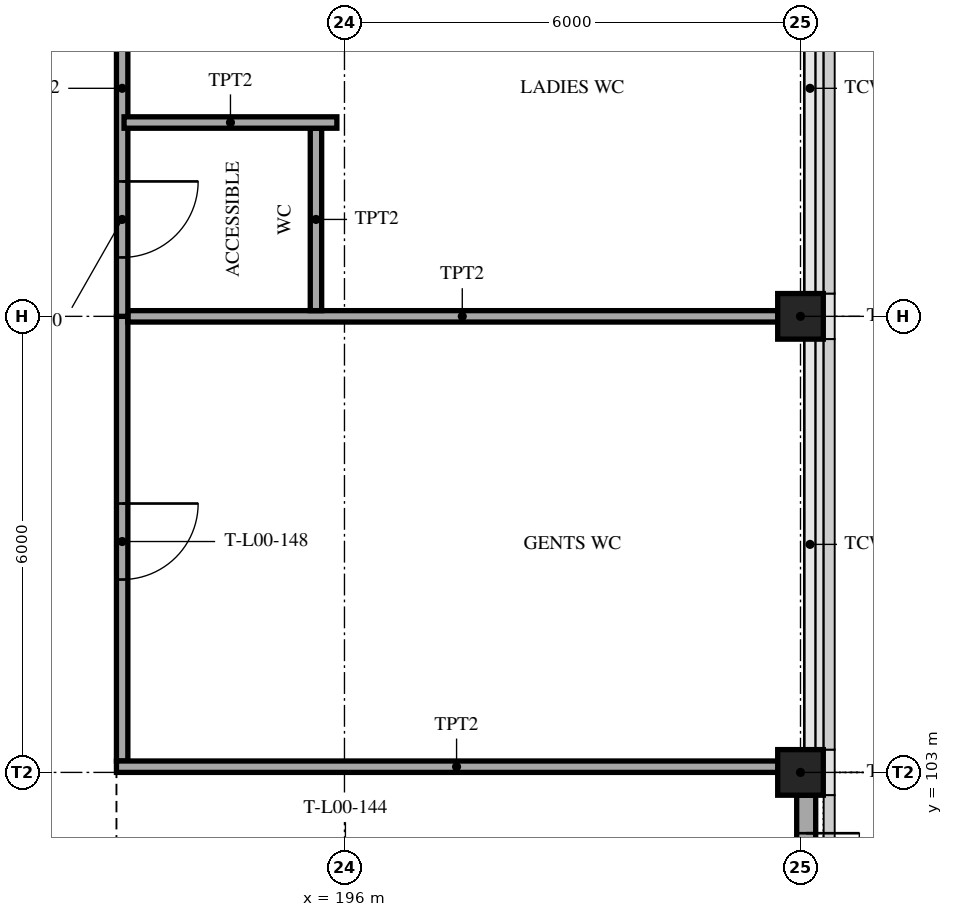
"""IFC4 building model, lengths in metres.
Left out: names, types, materials, properties, quantities, classifications, styles, units other than length and angle.
Written with IfcOpenShell. Run it as: python <this file> out.ifc"""

import sys

from ifc_helpers import new_model, si_unit, direction, frame, frame_2d, origin, origin_2d, place, context, subcontext, project, spatial, rectangle, hollow_rectangle, extrude, element, fill, save


model = new_model("IFC4")
c1 = context("Model", 3, precision=1e-05, world=origin(), true_north=direction((0.0, 1.0)))
c2 = subcontext(c1, "Body", "Model", "MODEL_VIEW")
j1 = project(units=[si_unit("LENGTHUNIT", "METRE"), si_unit("PLANEANGLEUNIT", "RADIAN")], contexts=[c1])
p1 = place(None, origin())
s1 = spatial("IfcSite", under=j1, at=p1, CompositionType="ELEMENT")
p2 = place(p1, origin())
s2 = spatial("IfcBuilding", under=s1, at=p2, CompositionType="ELEMENT")
p3 = place(p2, origin())
s3 = spatial("IfcBuildingStorey", under=s2, at=p3, CompositionType="ELEMENT", Elevation=0.0)
for number, where, z_axis, x_axis in (
    (1, (202.0, 103.0, 0.0), (0.0, 0.0, 1.0), (1.0, 0.0, 0.0)),
    (2, (202.0, 109.0, 0.0), (0.0, 0.0, 1.0), (1.0, 0.0, 0.0)),
):
    element("IfcColumn", number, at=place(p3, frame(where, z_axis=z_axis, x_axis=x_axis)), inside=s3, PredefinedType="COLUMN", context=c2, shape_type="SweptSolid", body=[
        extrude(hollow_rectangle(XDim=0.6, YDim=0.6, WallThickness=0.04, at=origin_2d()), origin(), (0.0, 0.0, 1.0), 5.0),
    ])
p4 = place(p3, frame((202.075, 97.3, 0.0), z_axis=(0.0, 0.0, 1.0), x_axis=(0.0, 1.0, 0.0)))
e3 = element("IfcWall", 3, at=p4, inside=s3, PredefinedType="SOLIDWALL", context=c2, shape_type="SweptSolid", body=[
    extrude(rectangle(XDim=5.4, YDim=0.25, at=frame_2d((2.7, 0.0))), origin(), (0.0, 0.0, 1.0), 4.35),
])
p5 = place(p4, frame((3.5, 0.0, 0.0)))
e4 = element("IfcOpeningElement", 4, at=p5, cuts=e3, PredefinedType="OPENING", context=c2, shape_type="SweptSolid", body=[
    extrude(rectangle(XDim=1.4, YDim=2.1, at=frame_2d((0.7, 1.05))), frame((0.0, 0.135, 0.0), z_axis=(0.0, -1.0, 0.0), x_axis=(1.0, 0.0, 0.0)), (0.0, 0.0, 1.0), 0.27),
])
p6 = place(p3, frame((193.075, 103.15, 0.0), z_axis=(0.0, 0.0, 1.0), x_axis=(0.0, 1.0, 0.0)))
e5 = element("IfcWall", 5, at=p6, inside=s3, PredefinedType="PARTITIONING", context=c2, shape_type="SweptSolid", body=[
    extrude(rectangle(XDim=5.85, YDim=0.15, at=frame_2d((2.925, 0.0))), origin(), (0.0, 0.0, 1.0), 4.2),
])
p7 = place(p6, frame((2.387, 0.0, 0.0)))
e6 = element("IfcOpeningElement", 6, at=p7, cuts=e5, PredefinedType="OPENING", context=c2, shape_type="SweptSolid", body=[
    extrude(rectangle(XDim=1.0, YDim=2.1, at=frame_2d((0.5, 1.05))), frame((0.0, 0.085, 0.0), z_axis=(0.0, -1.0, 0.0), x_axis=(1.0, 0.0, 0.0)), (0.0, 0.0, 1.0), 0.17),
])
p8 = place(p3, frame((193.15, 109.0, 0.0), z_axis=(0.0, 0.0, 1.0), x_axis=(1.0, 0.0, 0.0)))
e7 = element("IfcWall", 7, at=p8, inside=s3, PredefinedType="PARTITIONING", context=c2, shape_type="SweptSolid", body=[
    extrude(rectangle(XDim=8.8, YDim=0.15, at=frame_2d((4.4, 0.0))), origin(), (0.0, 0.0, 1.0), 4.2),
])
p9 = place(p3, frame((193.075, 109.0, 0.0), z_axis=(0.0, 0.0, 1.0), x_axis=(0.0, 1.0, 0.0)))
e8 = element("IfcWall", 8, at=p9, inside=s3, PredefinedType="PARTITIONING", context=c2, shape_type="SweptSolid", body=[
    extrude(rectangle(XDim=6.0, YDim=0.15, at=frame_2d((3.0, 0.0))), origin(), (0.0, 0.0, 1.0), 4.2),
])
p10 = place(p9, frame((3.7, 0.0, 0.0)))
e9 = element("IfcOpeningElement", 9, at=p10, cuts=e8, PredefinedType="OPENING", context=c2, shape_type="SweptSolid", body=[
    extrude(rectangle(XDim=1.0, YDim=2.1, at=frame_2d((0.5, 1.05))), frame((0.0, 0.085, 0.0), z_axis=(0.0, -1.0, 0.0), x_axis=(1.0, 0.0, 0.0)), (0.0, 0.0, 1.0), 0.17),
])
p11 = place(p9, frame((0.775, 0.0, 0.0)))
e10 = element("IfcOpeningElement", 10, at=p11, cuts=e8, PredefinedType="OPENING", context=c2, shape_type="SweptSolid", body=[
    extrude(rectangle(XDim=1.0, YDim=2.1, at=frame_2d((0.5, 1.05))), frame((0.0, 0.085, 0.0), z_axis=(0.0, -1.0, 0.0), x_axis=(1.0, 0.0, 0.0)), (0.0, 0.0, 1.0), 0.17),
])
p12 = place(p3, frame((195.625, 109.075, 0.0), z_axis=(0.0, 0.0, 1.0), x_axis=(0.0, 1.0, 0.0)))
e11 = element("IfcWall", 11, at=p12, inside=s3, PredefinedType="PARTITIONING", context=c2, shape_type="SweptSolid", body=[
    extrude(rectangle(XDim=2.4, YDim=0.15, at=frame_2d((1.2, 0.0))), origin(), (0.0, 0.0, 1.0), 4.2),
])
p13 = place(p3, frame((193.1, 111.55, 0.0), z_axis=(0.0, 0.0, 1.0), x_axis=(1.0, 0.0, 0.0)))
e12 = element("IfcWall", 12, at=p13, inside=s3, PredefinedType="PARTITIONING", context=c2, shape_type="SweptSolid", body=[
    extrude(rectangle(XDim=2.8, YDim=0.15, at=frame_2d((1.4, 0.0))), origin(), (0.0, 0.0, 1.0), 4.8),
])
p14 = place(p3, frame((193.0, 103.075, 0.0), z_axis=(0.0, 0.0, 1.0), x_axis=(1.0, 0.0, 0.0)))
e13 = element("IfcWall", 13, at=p14, inside=s3, PredefinedType="PARTITIONING", context=c2, shape_type="SweptSolid", body=[
    extrude(rectangle(XDim=8.95, YDim=0.15, at=frame_2d((4.475, 0.0))), origin(), (0.0, 0.0, 1.0), 4.2),
])
p15 = place(p5, frame((1.4, 0.0, 0.0), z_axis=(0.0, 0.0, 1.0), x_axis=(-1.0, 0.0, 0.0)))
e14 = element("IfcDoor", 14, at=p15, inside=s3, OperationType="DOUBLE_DOOR_SINGLE_SWING", PredefinedType="DOOR", context=c2, shape_type="SweptSolid", body=[
    extrude(rectangle(XDim=1.4, YDim=2.1, at=frame_2d((0.7, 1.05))), frame((0.0, 0.025, 0.0), z_axis=(0.0, -1.0, 0.0), x_axis=(1.0, 0.0, 0.0)), (0.0, 0.0, 1.0), 0.05),
])
fill(e4, e14)
p16 = place(p7, frame((1.0, 0.0, 0.0), z_axis=(0.0, 0.0, 1.0), x_axis=(-1.0, 0.0, 0.0)))
e15 = element("IfcDoor", 15, at=p16, inside=s3, OperationType="SINGLE_SWING_LEFT", PredefinedType="DOOR", context=c2, shape_type="SweptSolid", body=[
    extrude(rectangle(XDim=1.0, YDim=2.1, at=frame_2d((0.5, 1.05))), frame((0.0, 0.025, 0.0), z_axis=(0.0, -1.0, 0.0), x_axis=(1.0, 0.0, 0.0)), (0.0, 0.0, 1.0), 0.05),
])
fill(e6, e15)
p17 = place(p11, frame((1.0, 0.0, 0.0), z_axis=(0.0, 0.0, 1.0), x_axis=(-1.0, 0.0, 0.0)))
e16 = element("IfcDoor", 16, at=p17, inside=s3, OperationType="SINGLE_SWING_LEFT", PredefinedType="DOOR", context=c2, shape_type="SweptSolid", body=[
    extrude(rectangle(XDim=1.0, YDim=2.1, at=frame_2d((0.5, 1.05))), frame((0.0, 0.025, 0.0), z_axis=(0.0, -1.0, 0.0), x_axis=(1.0, 0.0, 0.0)), (0.0, 0.0, 1.0), 0.05),
])
fill(e10, e16)
save(model, sys.argv[1])
